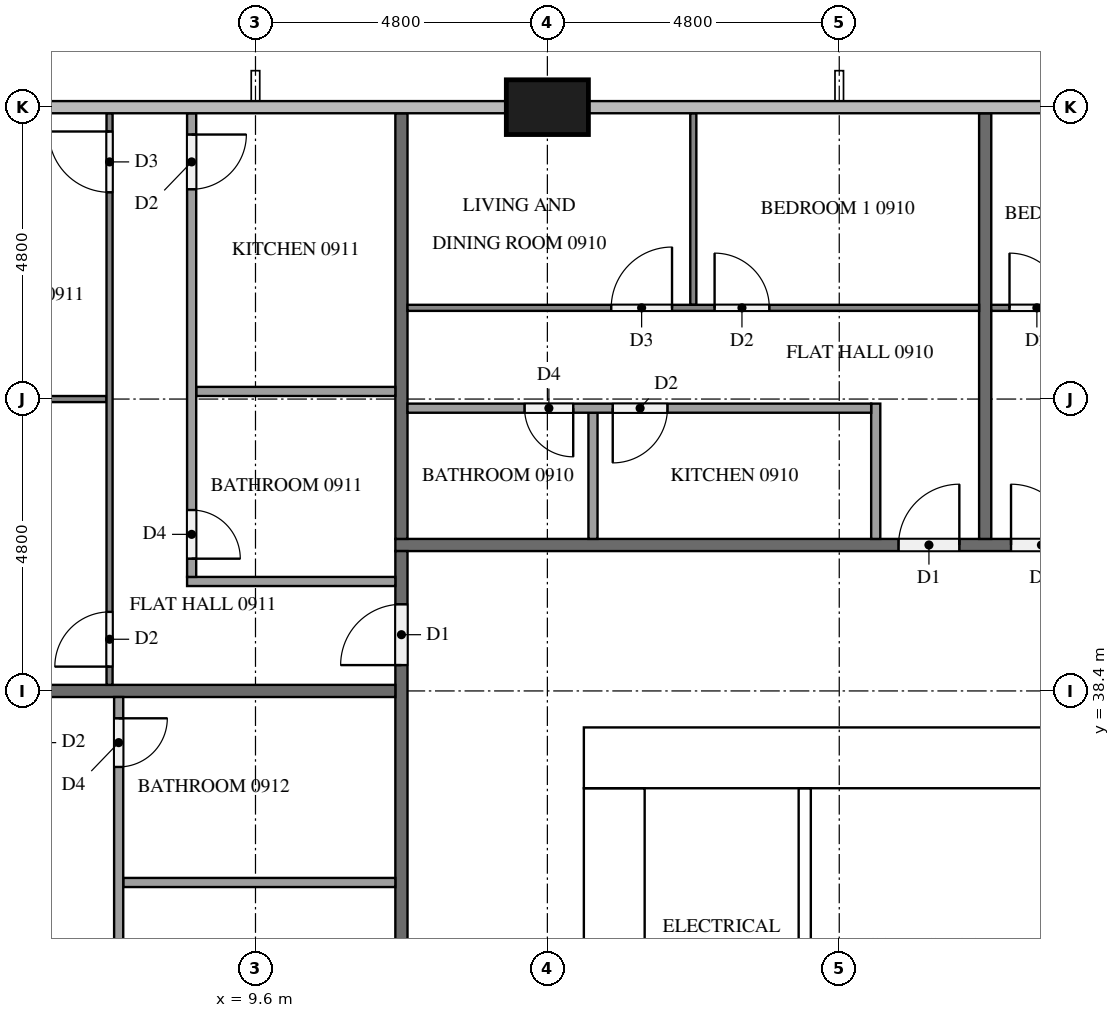
"""IFC4 building model, lengths in metres.
Left out: names, types, materials, properties, quantities, classifications, styles, units other than length and angle.
Written with IfcOpenShell. Run it as: python <this file> out.ifc"""

import sys

from ifc_helpers import new_model, si_unit, direction, frame, frame_2d, origin, origin_2d, place, context, subcontext, project, spatial, rectangle, extrude, element, fill, save


model = new_model("IFC4")
c1 = context("Model", 3, precision=1e-05, world=origin(), true_north=direction((0.0, 1.0)))
c2 = subcontext(c1, "Body", "Model", "MODEL_VIEW")
j1 = project(units=[si_unit("LENGTHUNIT", "METRE"), si_unit("PLANEANGLEUNIT", "RADIAN")], contexts=[c1])
p1 = place(None, origin())
s1 = spatial("IfcSite", under=j1, at=p1, CompositionType="ELEMENT")
p2 = place(p1, origin())
s2 = spatial("IfcBuilding", under=s1, at=p2, CompositionType="ELEMENT")
p3 = place(p2, frame((0.0, 0.0, 39.9)))
s3 = spatial("IfcBuildingStorey", under=s2, at=p3, CompositionType="ELEMENT", Elevation=39.9)
p4 = place(p3, frame((15.0, 37.3, 0.0), z_axis=(0.0, 0.0, 1.0), x_axis=(1.0, 0.0, 0.0)))
e1 = element("IfcWall", 1, at=p4, inside=s3, PredefinedType="SHEAR", context=c2, shape_type="SweptSolid", body=[
    extrude(rectangle(XDim=32.4, YDim=1.0, at=frame_2d((16.2, 0.0))), origin(), (0.0, 0.0, 1.0), 3.2),
])
p5 = place(p4, frame((15.3, 0.0, 0.0)))
e2 = element("IfcOpeningElement", 2, at=p5, cuts=e1, PredefinedType="OPENING", context=c2, shape_type="SweptSolid", body=[
    extrude(rectangle(XDim=1.8, YDim=2.1, at=frame_2d((0.9, 1.05))), frame((0.0, 0.51, 0.0), z_axis=(0.0, -1.0, 0.0), x_axis=(1.0, 0.0, 0.0)), (0.0, 0.0, 1.0), 1.02),
])
p6 = place(p4, frame((1.766, 0.0, 0.0)))
e3 = element("IfcOpeningElement", 3, at=p6, cuts=e1, PredefinedType="OPENING", context=c2, shape_type="SweptSolid", body=[
    extrude(rectangle(XDim=1.0, YDim=2.1, at=frame_2d((0.5, 1.05))), frame((0.0, 0.51, 0.0), z_axis=(0.0, -1.0, 0.0), x_axis=(1.0, 0.0, 0.0)), (0.0, 0.0, 1.0), 1.02),
])
p7 = place(p4, frame((5.241, 0.0, 0.0)))
e4 = element("IfcOpeningElement", 4, at=p7, cuts=e1, PredefinedType="OPENING", context=c2, shape_type="SweptSolid", body=[
    extrude(rectangle(XDim=1.0, YDim=2.1, at=frame_2d((0.5, 1.05))), frame((0.0, 0.51, 0.0), z_axis=(0.0, -1.0, 0.0), x_axis=(1.0, 0.0, 0.0)), (0.0, 0.0, 1.0), 1.02),
])
p8 = place(p3, frame((15.5, 16.0, 0.0), z_axis=(0.0, 0.0, 1.0), x_axis=(0.0, 1.0, 0.0)))
e5 = element("IfcWall", 5, at=p8, inside=s3, PredefinedType="SHEAR", context=c2, shape_type="SweptSolid", body=[
    extrude(rectangle(XDim=20.8, YDim=1.0, at=frame_2d((10.4, 0.0))), origin(), (0.0, 0.0, 1.0), 3.2),
])
p9 = place(p8, frame((4.76, 0.0, 0.0)))
e6 = element("IfcOpeningElement", 6, at=p9, cuts=e5, PredefinedType="OPENING", context=c2, shape_type="SweptSolid", body=[
    extrude(rectangle(XDim=1.2, YDim=2.1, at=frame_2d((0.6, 1.05))), frame((0.0, 0.51, 0.0), z_axis=(0.0, -1.0, 0.0), x_axis=(1.0, 0.0, 0.0)), (0.0, 0.0, 1.0), 1.02),
])
p10 = place(p3, frame((14.4, 48.0, 0.0), z_axis=(0.0, 0.0, 1.0), x_axis=(1.0, 0.0, 0.0)))
e7 = element("IfcColumn", 7, at=p10, inside=s3, PredefinedType="COLUMN", context=c2, shape_type="SweptSolid", body=[
    extrude(rectangle(XDim=1.35, YDim=0.9, at=origin_2d()), origin(), (0.0, 0.0, 1.0), 3.2),
])
p11 = place(p3, frame((18.633, 31.6, 0.0), z_axis=(0.0, 0.0, 1.0), x_axis=(0.0, 1.0, 0.0)))
e8 = element("IfcWall", 8, at=p11, inside=s3, PredefinedType="PARTITIONING", context=c2, shape_type="SweptSolid", body=[
    extrude(rectangle(XDim=5.2, YDim=0.2, at=frame_2d((2.6, 0.0))), origin(), (0.0, 0.0, 1.0), 3.2),
])
p12 = place(p3, frame((11.9, 40.8, 0.0), z_axis=(0.0, 0.0, 1.0), x_axis=(1.0, 0.0, 0.0)))
e9 = element("IfcWall", 9, at=p12, inside=s3, PredefinedType="PARTITIONING", context=c2, shape_type="SweptSolid", body=[
    extrude(rectangle(XDim=38.6, YDim=0.2, at=frame_2d((19.3, 0.0))), origin(), (0.0, 0.0, 1.0), 3.2),
])
p13 = place(p12, frame((22.125, 0.0, 0.0)))
e10 = element("IfcOpeningElement", 10, at=p13, cuts=e9, PredefinedType="OPENING", context=c2, shape_type="SweptSolid", body=[
    extrude(rectangle(XDim=1.0, YDim=2.1, at=frame_2d((0.5, 1.05))), frame((0.0, 0.11, 0.0), z_axis=(0.0, -1.0, 0.0), x_axis=(1.0, 0.0, 0.0)), (0.0, 0.0, 1.0), 0.22),
])
p14 = place(p12, frame((10.125, 0.0, 0.0)))
e11 = element("IfcOpeningElement", 11, at=p14, cuts=e9, PredefinedType="OPENING", context=c2, shape_type="SweptSolid", body=[
    extrude(rectangle(XDim=1.0, YDim=2.1, at=frame_2d((0.5, 1.05))), frame((0.0, 0.11, 0.0), z_axis=(0.0, -1.0, 0.0), x_axis=(1.0, 0.0, 0.0)), (0.0, 0.0, 1.0), 0.22),
])
p15 = place(p12, frame((8.275, 0.0, 0.0)))
e12 = element("IfcOpeningElement", 12, at=p15, cuts=e9, PredefinedType="OPENING", context=c2, shape_type="SweptSolid", body=[
    extrude(rectangle(XDim=1.0, YDim=2.1, at=frame_2d((0.5, 1.05))), frame((0.0, 0.11, 0.0), z_axis=(0.0, -1.0, 0.0), x_axis=(1.0, 0.0, 0.0)), (0.0, 0.0, 1.0), 0.22),
])
p16 = place(p3, frame((12.0, 12.1, 0.0), z_axis=(0.0, 0.0, 1.0), x_axis=(0.0, 1.0, 0.0)))
e13 = element("IfcWall", 13, at=p16, inside=s3, PredefinedType="PARTITIONING", context=c2, shape_type="SweptSolid", body=[
    extrude(rectangle(XDim=28.6, YDim=0.2, at=frame_2d((14.3, 0.0))), origin(), (0.0, 0.0, 1.0), 3.2),
])
p17 = place(p16, frame((26.725, 0.0, 0.0)))
e14 = element("IfcOpeningElement", 14, at=p17, cuts=e13, PredefinedType="OPENING", context=c2, shape_type="SweptSolid", body=[
    extrude(rectangle(XDim=1.0, YDim=2.1, at=frame_2d((0.5, 1.05))), frame((0.0, 0.11, 0.0), z_axis=(0.0, -1.0, 0.0), x_axis=(1.0, 0.0, 0.0)), (0.0, 0.0, 1.0), 0.22),
])
p18 = place(p16, frame((17.125, 0.0, 0.0)))
e15 = element("IfcOpeningElement", 15, at=p18, cuts=e13, PredefinedType="OPENING", context=c2, shape_type="SweptSolid", body=[
    extrude(rectangle(XDim=1.0, YDim=2.1, at=frame_2d((0.5, 1.05))), frame((0.0, 0.11, 0.0), z_axis=(0.0, -1.0, 0.0), x_axis=(1.0, 0.0, 0.0)), (0.0, 0.0, 1.0), 0.22),
])
p19 = place(p16, frame((15.275, 0.0, 0.0)))
e16 = element("IfcOpeningElement", 16, at=p19, cuts=e13, PredefinedType="OPENING", context=c2, shape_type="SweptSolid", body=[
    extrude(rectangle(XDim=1.0, YDim=2.1, at=frame_2d((0.5, 1.05))), frame((0.0, 0.11, 0.0), z_axis=(0.0, -1.0, 0.0), x_axis=(1.0, 0.0, 0.0)), (0.0, 0.0, 1.0), 0.22),
])
p20 = place(p16, frame((5.675, 0.0, 0.0)))
e17 = element("IfcOpeningElement", 17, at=p20, cuts=e13, PredefinedType="OPENING", context=c2, shape_type="SweptSolid", body=[
    extrude(rectangle(XDim=1.0, YDim=2.1, at=frame_2d((0.5, 1.05))), frame((0.0, 0.11, 0.0), z_axis=(0.0, -1.0, 0.0), x_axis=(1.0, 0.0, 0.0)), (0.0, 0.0, 1.0), 0.22),
])
for number, where, z_axis, x_axis in (
    (18, (21.6, 47.9, 0.0), (0.0, 0.0, 1.0), (0.0, -1.0, 0.0)),
    (19, (12.0, 47.9, 0.0), (0.0, 0.0, 1.0), (0.0, -1.0, 0.0)),
):
    element("IfcWall", number, at=place(p3, frame(where, z_axis=z_axis, x_axis=x_axis)), inside=s3, PredefinedType="PARTITIONING", context=c2, shape_type="SweptSolid", body=[
        extrude(rectangle(XDim=7.0, YDim=0.2, at=frame_2d((3.5, 0.0))), origin(), (0.0, 0.0, 1.0), 3.2),
    ])
p21 = place(p3, frame((0.1, 38.4, 0.0), z_axis=(0.0, 0.0, 1.0), x_axis=(1.0, 0.0, 0.0)))
e20 = element("IfcWall", 20, at=p21, inside=s3, PredefinedType="PARTITIONING", context=c2, shape_type="SweptSolid", body=[
    extrude(rectangle(XDim=11.8, YDim=0.2, at=frame_2d((5.9, 0.0))), origin(), (0.0, 0.0, 1.0), 3.2),
])
p22 = place(p3, frame((21.7, 44.7, 0.0), z_axis=(0.0, 0.0, 1.0), x_axis=(1.0, 0.0, 0.0)))
e21 = element("IfcWall", 21, at=p22, inside=s3, PredefinedType="PARTITIONING", context=c2, shape_type="SweptSolid", body=[
    extrude(rectangle(XDim=11.8, YDim=0.1, at=frame_2d((5.9, 0.0))), origin(), (0.0, 0.0, 1.0), 3.2),
])
p23 = place(p22, frame((0.3, 0.0, 0.0)))
e22 = element("IfcOpeningElement", 22, at=p23, cuts=e21, PredefinedType="OPENING", context=c2, shape_type="SweptSolid", body=[
    extrude(rectangle(XDim=0.9, YDim=2.1, at=frame_2d((0.45, 1.05))), frame((0.0, 0.06, 0.0), z_axis=(0.0, -1.0, 0.0), x_axis=(1.0, 0.0, 0.0)), (0.0, 0.0, 1.0), 0.12),
])
p24 = place(p22, frame((10.5, 0.0, 0.0)))
e23 = element("IfcOpeningElement", 23, at=p24, cuts=e21, PredefinedType="OPENING", context=c2, shape_type="SweptSolid", body=[
    extrude(rectangle(XDim=1.0, YDim=2.1, at=frame_2d((0.5, 1.05))), frame((0.0, 0.06, 0.0), z_axis=(0.0, -1.0, 0.0), x_axis=(1.0, 0.0, 0.0)), (0.0, 0.0, 1.0), 0.12),
])
p25 = place(p3, frame((16.8, 44.75, 0.0), z_axis=(0.0, 0.0, 1.0), x_axis=(0.0, 1.0, 0.0)))
e24 = element("IfcWall", 24, at=p25, inside=s3, PredefinedType="PARTITIONING", context=c2, shape_type="SweptSolid", body=[
    extrude(rectangle(XDim=3.15, YDim=0.1, at=frame_2d((1.575, 0.0))), origin(), (0.0, 0.0, 1.0), 3.2),
])
p26 = place(p3, frame((12.1, 44.7, 0.0), z_axis=(0.0, 0.0, 1.0), x_axis=(1.0, 0.0, 0.0)))
e25 = element("IfcWall", 25, at=p26, inside=s3, PredefinedType="PARTITIONING", context=c2, shape_type="SweptSolid", body=[
    extrude(rectangle(XDim=9.4, YDim=0.1, at=frame_2d((4.7, 0.0))), origin(), (0.0, 0.0, 1.0), 3.2),
])
p27 = place(p26, frame((5.05, 0.0, 0.0)))
e26 = element("IfcOpeningElement", 26, at=p27, cuts=e25, PredefinedType="OPENING", context=c2, shape_type="SweptSolid", body=[
    extrude(rectangle(XDim=0.9, YDim=2.1, at=frame_2d((0.45, 1.05))), frame((0.0, 0.06, 0.0), z_axis=(0.0, -1.0, 0.0), x_axis=(1.0, 0.0, 0.0)), (0.0, 0.0, 1.0), 0.12),
])
p28 = place(p26, frame((3.35, 0.0, 0.0)))
e27 = element("IfcOpeningElement", 27, at=p28, cuts=e25, PredefinedType="OPENING", context=c2, shape_type="SweptSolid", body=[
    extrude(rectangle(XDim=1.0, YDim=2.1, at=frame_2d((0.5, 1.05))), frame((0.0, 0.06, 0.0), z_axis=(0.0, -1.0, 0.0), x_axis=(1.0, 0.0, 0.0)), (0.0, 0.0, 1.0), 0.12),
])
p29 = place(p3, frame((15.15, 40.9, 0.0), z_axis=(0.0, 0.0, 1.0), x_axis=(0.0, 1.0, 0.0)))
e28 = element("IfcWall", 28, at=p29, inside=s3, PredefinedType="PARTITIONING", context=c2, shape_type="SweptSolid", body=[
    extrude(rectangle(XDim=2.075, YDim=0.15, at=frame_2d((1.038, 0.0))), origin(), (0.0, 0.0, 1.0), 3.2),
])
p30 = place(p3, frame((19.8, 40.9, 0.0), z_axis=(0.0, 0.0, 1.0), x_axis=(0.0, 1.0, 0.0)))
e29 = element("IfcWall", 29, at=p30, inside=s3, PredefinedType="PARTITIONING", context=c2, shape_type="SweptSolid", body=[
    extrude(rectangle(XDim=2.225, YDim=0.15, at=frame_2d((1.113, 0.0))), origin(), (0.0, 0.0, 1.0), 3.2),
])
p31 = place(p3, frame((19.725, 43.05, 0.0), z_axis=(0.0, 0.0, 1.0), x_axis=(-1.0, 0.0, 0.0)))
e30 = element("IfcWall", 30, at=p31, inside=s3, PredefinedType="PARTITIONING", context=c2, shape_type="SweptSolid", body=[
    extrude(rectangle(XDim=7.625, YDim=0.15, at=frame_2d((3.812, 0.0))), origin(), (0.0, 0.0, 1.0), 3.2),
])
p32 = place(p31, frame((3.35, 0.0, 0.0)))
e31 = element("IfcOpeningElement", 31, at=p32, cuts=e30, PredefinedType="OPENING", context=c2, shape_type="SweptSolid", body=[
    extrude(rectangle(XDim=0.9, YDim=2.1, at=frame_2d((0.45, 1.05))), frame((0.0, 0.085, 0.0), z_axis=(0.0, -1.0, 0.0), x_axis=(1.0, 0.0, 0.0)), (0.0, 0.0, 1.0), 0.17),
])
p33 = place(p31, frame((4.9, 0.0, 0.0)))
e32 = element("IfcOpeningElement", 32, at=p33, cuts=e30, PredefinedType="OPENING", context=c2, shape_type="SweptSolid", body=[
    extrude(rectangle(XDim=0.8, YDim=2.1, at=frame_2d((0.4, 1.05))), frame((0.0, 0.085, 0.0), z_axis=(0.0, -1.0, 0.0), x_axis=(1.0, 0.0, 0.0)), (0.0, 0.0, 1.0), 0.17),
])
p34 = place(p3, frame((7.15, 43.2, 0.0), z_axis=(0.0, 0.0, 1.0), x_axis=(-1.0, 0.0, 0.0)))
e33 = element("IfcWall", 33, at=p34, inside=s3, PredefinedType="PARTITIONING", context=c2, shape_type="SweptSolid", body=[
    extrude(rectangle(XDim=6.525, YDim=0.1, at=frame_2d((3.262, 0.0))), origin(), (0.0, 0.0, 1.0), 3.2),
])
p35 = place(p3, frame((7.2, 38.5, 0.0), z_axis=(0.0, 0.0, 1.0), x_axis=(0.0, 1.0, 0.0)))
e34 = element("IfcWall", 34, at=p35, inside=s3, PredefinedType="PARTITIONING", context=c2, shape_type="SweptSolid", body=[
    extrude(rectangle(XDim=9.4, YDim=0.1, at=frame_2d((4.7, 0.0))), origin(), (0.0, 0.0, 1.0), 3.2),
])
p36 = place(p35, frame((0.3, 0.0, 0.0)))
e35 = element("IfcOpeningElement", 35, at=p36, cuts=e34, PredefinedType="OPENING", context=c2, shape_type="SweptSolid", body=[
    extrude(rectangle(XDim=0.9, YDim=2.1, at=frame_2d((0.45, 1.05))), frame((0.0, 0.06, 0.0), z_axis=(0.0, -1.0, 0.0), x_axis=(1.0, 0.0, 0.0)), (0.0, 0.0, 1.0), 0.12),
])
p37 = place(p35, frame((8.1, 0.0, 0.0)))
e36 = element("IfcOpeningElement", 36, at=p37, cuts=e34, PredefinedType="OPENING", context=c2, shape_type="SweptSolid", body=[
    extrude(rectangle(XDim=1.0, YDim=2.1, at=frame_2d((0.5, 1.05))), frame((0.0, 0.06, 0.0), z_axis=(0.0, -1.0, 0.0), x_axis=(1.0, 0.0, 0.0)), (0.0, 0.0, 1.0), 0.12),
])
p38 = place(p3, frame((11.9, 43.325, 0.0), z_axis=(0.0, 0.0, 1.0), x_axis=(-1.0, 0.0, 0.0)))
e37 = element("IfcWall", 37, at=p38, inside=s3, PredefinedType="PARTITIONING", context=c2, shape_type="SweptSolid", body=[
    extrude(rectangle(XDim=3.275, YDim=0.15, at=frame_2d((1.637, 0.0))), origin(), (0.0, 0.0, 1.0), 3.2),
])
p39 = place(p3, frame((11.9, 40.2, 0.0), z_axis=(0.0, 0.0, 1.0), x_axis=(-1.0, 0.0, 0.0)))
e38 = element("IfcWall", 38, at=p39, inside=s3, PredefinedType="PARTITIONING", context=c2, shape_type="SweptSolid", body=[
    extrude(rectangle(XDim=3.425, YDim=0.15, at=frame_2d((1.712, 0.0))), origin(), (0.0, 0.0, 1.0), 3.2),
])
p40 = place(p3, frame((8.55, 47.9, 0.0), z_axis=(0.0, 0.0, 1.0), x_axis=(0.0, -1.0, 0.0)))
e39 = element("IfcWall", 39, at=p40, inside=s3, PredefinedType="PARTITIONING", context=c2, shape_type="SweptSolid", body=[
    extrude(rectangle(XDim=7.625, YDim=0.15, at=frame_2d((3.812, 0.0))), origin(), (0.0, 0.0, 1.0), 3.2),
])
p41 = place(p40, frame((6.525, 0.0, 0.0)))
e40 = element("IfcOpeningElement", 40, at=p41, cuts=e39, PredefinedType="OPENING", context=c2, shape_type="SweptSolid", body=[
    extrude(rectangle(XDim=0.8, YDim=2.1, at=frame_2d((0.4, 1.05))), frame((0.0, 0.085, 0.0), z_axis=(0.0, -1.0, 0.0), x_axis=(1.0, 0.0, 0.0)), (0.0, 0.0, 1.0), 0.17),
])
p42 = place(p40, frame((0.35, 0.0, 0.0)))
e41 = element("IfcOpeningElement", 41, at=p42, cuts=e39, PredefinedType="OPENING", context=c2, shape_type="SweptSolid", body=[
    extrude(rectangle(XDim=0.9, YDim=2.1, at=frame_2d((0.45, 1.05))), frame((0.0, 0.085, 0.0), z_axis=(0.0, -1.0, 0.0), x_axis=(1.0, 0.0, 0.0)), (0.0, 0.0, 1.0), 0.17),
])
p43 = place(p3, frame((11.9, 35.25, 0.0), z_axis=(0.0, 0.0, 1.0), x_axis=(-1.0, 0.0, 0.0)))
e42 = element("IfcWall", 42, at=p43, inside=s3, PredefinedType="PARTITIONING", context=c2, shape_type="SweptSolid", body=[
    extrude(rectangle(XDim=4.475, YDim=0.15, at=frame_2d((2.237, 0.0))), origin(), (0.0, 0.0, 1.0), 3.2),
])
p44 = place(p3, frame((7.35, 38.3, 0.0), z_axis=(0.0, 0.0, 1.0), x_axis=(0.0, -1.0, 0.0)))
e43 = element("IfcWall", 43, at=p44, inside=s3, PredefinedType="PARTITIONING", context=c2, shape_type="SweptSolid", body=[
    extrude(rectangle(XDim=7.625, YDim=0.15, at=frame_2d((3.812, 0.0))), origin(), (0.0, 0.0, 1.0), 3.2),
])
p45 = place(p44, frame((6.425, 0.0, 0.0)))
e44 = element("IfcOpeningElement", 44, at=p45, cuts=e43, PredefinedType="OPENING", context=c2, shape_type="SweptSolid", body=[
    extrude(rectangle(XDim=0.9, YDim=2.1, at=frame_2d((0.45, 1.05))), frame((0.0, 0.085, 0.0), z_axis=(0.0, -1.0, 0.0), x_axis=(1.0, 0.0, 0.0)), (0.0, 0.0, 1.0), 0.17),
])
p46 = place(p44, frame((0.35, 0.0, 0.0)))
e45 = element("IfcOpeningElement", 45, at=p46, cuts=e43, PredefinedType="OPENING", context=c2, shape_type="SweptSolid", body=[
    extrude(rectangle(XDim=0.8, YDim=2.1, at=frame_2d((0.4, 1.05))), frame((0.0, 0.085, 0.0), z_axis=(0.0, -1.0, 0.0), x_axis=(1.0, 0.0, 0.0)), (0.0, 0.0, 1.0), 0.17),
])
p47 = place(p6, origin())
e46 = element("IfcDoor", 46, at=p47, inside=s3, OperationType="SINGLE_SWING_RIGHT", PredefinedType="DOOR", context=c2, shape_type="SweptSolid", body=[
    extrude(rectangle(XDim=1.0, YDim=2.1, at=frame_2d((0.5, 1.05))), frame((0.0, 0.025, 0.0), z_axis=(0.0, -1.0, 0.0), x_axis=(1.0, 0.0, 0.0)), (0.0, 0.0, 1.0), 0.05),
])
fill(e3, e46)
p48 = place(p7, origin())
e47 = element("IfcDoor", 47, at=p48, inside=s3, OperationType="SINGLE_SWING_LEFT", PredefinedType="DOOR", context=c2, shape_type="SweptSolid", body=[
    extrude(rectangle(XDim=1.0, YDim=2.1, at=frame_2d((0.5, 1.05))), frame((0.0, 0.025, 0.0), z_axis=(0.0, -1.0, 0.0), x_axis=(1.0, 0.0, 0.0)), (0.0, 0.0, 1.0), 0.05),
])
fill(e4, e47)
p49 = place(p14, origin())
e48 = element("IfcDoor", 48, at=p49, inside=s3, OperationType="SINGLE_SWING_LEFT", PredefinedType="DOOR", context=c2, shape_type="SweptSolid", body=[
    extrude(rectangle(XDim=1.0, YDim=2.1, at=frame_2d((0.5, 1.05))), frame((0.0, 0.025, 0.0), z_axis=(0.0, -1.0, 0.0), x_axis=(1.0, 0.0, 0.0)), (0.0, 0.0, 1.0), 0.05),
])
fill(e11, e48)
p50 = place(p15, origin())
e49 = element("IfcDoor", 49, at=p50, inside=s3, OperationType="SINGLE_SWING_RIGHT", PredefinedType="DOOR", context=c2, shape_type="SweptSolid", body=[
    extrude(rectangle(XDim=1.0, YDim=2.1, at=frame_2d((0.5, 1.05))), frame((0.0, 0.025, 0.0), z_axis=(0.0, -1.0, 0.0), x_axis=(1.0, 0.0, 0.0)), (0.0, 0.0, 1.0), 0.05),
])
fill(e12, e49)
p51 = place(p17, origin())
e50 = element("IfcDoor", 50, at=p51, inside=s3, OperationType="SINGLE_SWING_LEFT", PredefinedType="DOOR", context=c2, shape_type="SweptSolid", body=[
    extrude(rectangle(XDim=1.0, YDim=2.1, at=frame_2d((0.5, 1.05))), frame((0.0, 0.025, 0.0), z_axis=(0.0, -1.0, 0.0), x_axis=(1.0, 0.0, 0.0)), (0.0, 0.0, 1.0), 0.05),
])
fill(e14, e50)
p52 = place(p23, origin())
e51 = element("IfcDoor", 51, at=p52, inside=s3, OperationType="SINGLE_SWING_LEFT", PredefinedType="DOOR", context=c2, shape_type="SweptSolid", body=[
    extrude(rectangle(XDim=0.9, YDim=2.1, at=frame_2d((0.45, 1.05))), frame((0.0, 0.025, 0.0), z_axis=(0.0, -1.0, 0.0), x_axis=(1.0, 0.0, 0.0)), (0.0, 0.0, 1.0), 0.05),
])
fill(e22, e51)
p53 = place(p27, origin())
e52 = element("IfcDoor", 52, at=p53, inside=s3, OperationType="SINGLE_SWING_LEFT", PredefinedType="DOOR", context=c2, shape_type="SweptSolid", body=[
    extrude(rectangle(XDim=0.9, YDim=2.1, at=frame_2d((0.45, 1.05))), frame((0.0, 0.025, 0.0), z_axis=(0.0, -1.0, 0.0), x_axis=(1.0, 0.0, 0.0)), (0.0, 0.0, 1.0), 0.05),
])
fill(e26, e52)
p54 = place(p28, origin())
e53 = element("IfcDoor", 53, at=p54, inside=s3, OperationType="SINGLE_SWING_RIGHT", PredefinedType="DOOR", context=c2, shape_type="SweptSolid", body=[
    extrude(rectangle(XDim=1.0, YDim=2.1, at=frame_2d((0.5, 1.05))), frame((0.0, 0.025, 0.0), z_axis=(0.0, -1.0, 0.0), x_axis=(1.0, 0.0, 0.0)), (0.0, 0.0, 1.0), 0.05),
])
fill(e27, e53)
p55 = place(p32, origin())
e54 = element("IfcDoor", 54, at=p55, inside=s3, OperationType="SINGLE_SWING_RIGHT", PredefinedType="DOOR", context=c2, shape_type="SweptSolid", body=[
    extrude(rectangle(XDim=0.9, YDim=2.1, at=frame_2d((0.45, 1.05))), frame((0.0, 0.025, 0.0), z_axis=(0.0, -1.0, 0.0), x_axis=(1.0, 0.0, 0.0)), (0.0, 0.0, 1.0), 0.05),
])
fill(e31, e54)
p56 = place(p33, origin())
e55 = element("IfcDoor", 55, at=p56, inside=s3, OperationType="SINGLE_SWING_LEFT", PredefinedType="DOOR", context=c2, shape_type="SweptSolid", body=[
    extrude(rectangle(XDim=0.8, YDim=2.1, at=frame_2d((0.4, 1.05))), frame((0.0, 0.025, 0.0), z_axis=(0.0, -1.0, 0.0), x_axis=(1.0, 0.0, 0.0)), (0.0, 0.0, 1.0), 0.05),
])
fill(e32, e55)
p57 = place(p36, origin())
e56 = element("IfcDoor", 56, at=p57, inside=s3, OperationType="SINGLE_SWING_LEFT", PredefinedType="DOOR", context=c2, shape_type="SweptSolid", body=[
    extrude(rectangle(XDim=0.9, YDim=2.1, at=frame_2d((0.45, 1.05))), frame((0.0, 0.025, 0.0), z_axis=(0.0, -1.0, 0.0), x_axis=(1.0, 0.0, 0.0)), (0.0, 0.0, 1.0), 0.05),
])
fill(e35, e56)
p58 = place(p37, origin())
e57 = element("IfcDoor", 57, at=p58, inside=s3, OperationType="SINGLE_SWING_RIGHT", PredefinedType="DOOR", context=c2, shape_type="SweptSolid", body=[
    extrude(rectangle(XDim=1.0, YDim=2.1, at=frame_2d((0.5, 1.05))), frame((0.0, 0.025, 0.0), z_axis=(0.0, -1.0, 0.0), x_axis=(1.0, 0.0, 0.0)), (0.0, 0.0, 1.0), 0.05),
])
fill(e36, e57)
p59 = place(p41, origin())
e58 = element("IfcDoor", 58, at=p59, inside=s3, OperationType="SINGLE_SWING_RIGHT", PredefinedType="DOOR", context=c2, shape_type="SweptSolid", body=[
    extrude(rectangle(XDim=0.8, YDim=2.1, at=frame_2d((0.4, 1.05))), frame((0.0, 0.025, 0.0), z_axis=(0.0, -1.0, 0.0), x_axis=(1.0, 0.0, 0.0)), (0.0, 0.0, 1.0), 0.05),
])
fill(e40, e58)
p60 = place(p42, origin())
e59 = element("IfcDoor", 59, at=p60, inside=s3, OperationType="SINGLE_SWING_LEFT", PredefinedType="DOOR", context=c2, shape_type="SweptSolid", body=[
    extrude(rectangle(XDim=0.9, YDim=2.1, at=frame_2d((0.45, 1.05))), frame((0.0, 0.025, 0.0), z_axis=(0.0, -1.0, 0.0), x_axis=(1.0, 0.0, 0.0)), (0.0, 0.0, 1.0), 0.05),
])
fill(e41, e59)
p61 = place(p46, origin())
e60 = element("IfcDoor", 60, at=p61, inside=s3, OperationType="SINGLE_SWING_LEFT", PredefinedType="DOOR", context=c2, shape_type="SweptSolid", body=[
    extrude(rectangle(XDim=0.8, YDim=2.1, at=frame_2d((0.4, 1.05))), frame((0.0, 0.025, 0.0), z_axis=(0.0, -1.0, 0.0), x_axis=(1.0, 0.0, 0.0)), (0.0, 0.0, 1.0), 0.05),
])
fill(e45, e60)
save(model, sys.argv[1])
